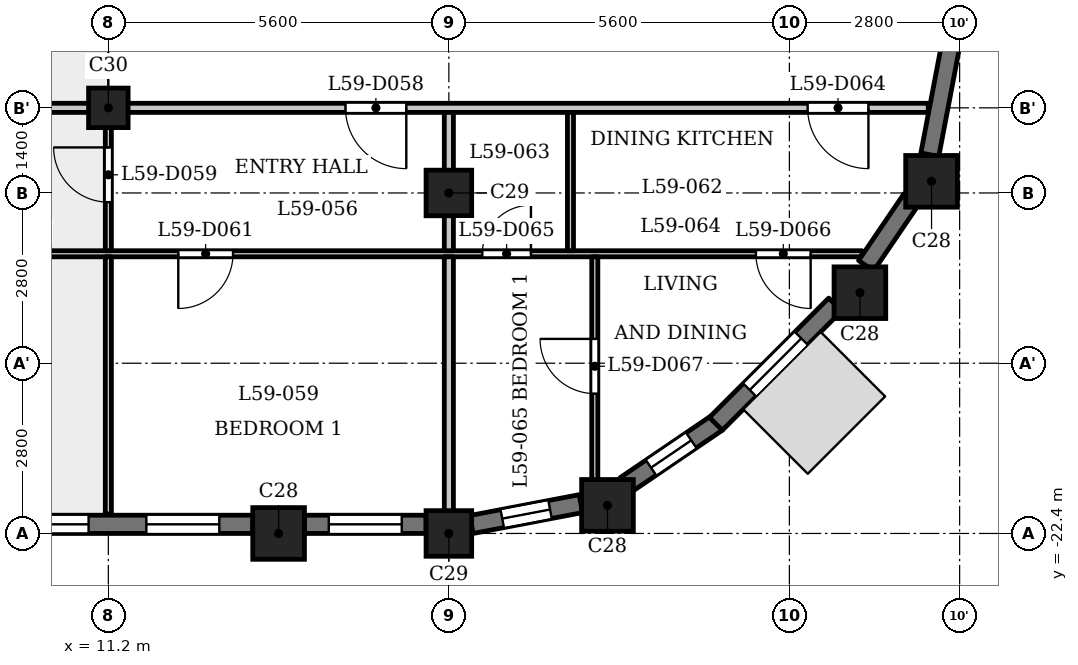
"""IFC4 building model, lengths in metres.
Left out: names, types, materials, properties, quantities, classifications, styles, units other than length and angle.
Written with IfcOpenShell. Run it as: python <this file> out.ifc"""

import sys

from ifc_helpers import new_model, si_unit, direction, frame, frame_2d, origin, origin_2d, place, context, subcontext, project, spatial, rectangle, extrude, element, fill, save


model = new_model("IFC4")
c1 = context("Model", 3, precision=1e-05, world=origin(), true_north=direction((0.0, 1.0)))
c2 = subcontext(c1, "Body", "Model", "MODEL_VIEW")
j1 = project(units=[si_unit("LENGTHUNIT", "METRE"), si_unit("PLANEANGLEUNIT", "RADIAN")], contexts=[c1])
p1 = place(None, origin())
s1 = spatial("IfcSite", under=j1, at=p1, CompositionType="ELEMENT")
p2 = place(p1, origin())
s2 = spatial("IfcBuilding", under=s1, at=p2, CompositionType="ELEMENT")
p3 = place(p2, frame((0.0, 0.0, 227.4)))
s3 = spatial("IfcBuildingStorey", under=s2, at=p3, CompositionType="ELEMENT", Elevation=227.4)
for number, where, z_axis, x_axis in (
    (1, (14.0, -22.4, 0.0), (0.0, 0.0, 1.0), (1.0, 0.0, 0.0)),
    (2, (19.409, -21.938, 0.0), (0.0, 0.0, 1.0), (1.0, 0.0, 0.0)),
    (3, (23.56, -18.44, 0.0), (0.0, 0.0, 1.0), (1.0, 0.0, 0.0)),
    (4, (24.738, -16.609, 0.0), (0.0, 0.0, 1.0), (1.0, 0.0, 0.0)),
):
    element("IfcColumn", number, at=place(p3, frame(where, z_axis=z_axis, x_axis=x_axis)), inside=s3, PredefinedType="COLUMN", context=c2, shape_type="SweptSolid", body=[
        extrude(rectangle(XDim=0.85, YDim=0.85, at=origin_2d()), origin(), (0.0, 0.0, 1.0), 3.5),
    ])
for number, where, z_axis, x_axis in (
    (5, (16.8, -22.4, 0.0), (0.0, 0.0, 1.0), (1.0, 0.0, 0.0)),
    (6, (16.8, -16.8, 0.0), (0.0, 0.0, 1.0), (1.0, 0.0, 0.0)),
):
    element("IfcColumn", number, at=place(p3, frame(where, z_axis=z_axis, x_axis=x_axis)), inside=s3, PredefinedType="COLUMN", context=c2, shape_type="SweptSolid", body=[
        extrude(rectangle(XDim=0.75, YDim=0.75, at=origin_2d()), origin(), (0.0, 0.0, 1.0), 3.5),
    ])
p4 = place(p3, frame((11.2, -15.4, 0.0), z_axis=(0.0, 0.0, 1.0), x_axis=(1.0, 0.0, 0.0)))
e7 = element("IfcColumn", 7, at=p4, inside=s3, PredefinedType="COLUMN", context=c2, shape_type="SweptSolid", body=[
    extrude(rectangle(XDim=0.65, YDim=0.65, at=origin_2d()), origin(), (0.0, 0.0, 1.0), 3.5),
])
p5 = place(p3, frame((8.825, -22.25, 0.0), z_axis=(0.0, 0.0, 1.0), x_axis=(1.0, 0.0, 0.0)))
e8 = element("IfcWall", 8, at=p5, inside=s3, PredefinedType="SOLIDWALL", context=c2, shape_type="SweptSolid", body=[
    extrude(rectangle(XDim=4.75, YDim=0.3, at=frame_2d((2.375, 0.0))), origin(), (0.0, 0.0, 1.0), 2.45),
])
p6 = place(p5, frame((0.25, 0.0, 0.9)))
e9 = element("IfcOpeningElement", 9, at=p6, cuts=e8, PredefinedType="OPENING", context=c2, shape_type="SweptSolid", body=[
    extrude(rectangle(XDim=1.8, YDim=1.25, at=frame_2d((0.9, 0.625))), frame((0.0, 0.16, 0.0), z_axis=(0.0, -1.0, 0.0), x_axis=(1.0, 0.0, 0.0)), (0.0, 0.0, 1.0), 0.32),
])
p7 = place(p5, frame((3.0, 0.0, 0.6)))
e10 = element("IfcOpeningElement", 10, at=p7, cuts=e8, PredefinedType="OPENING", context=c2, shape_type="SweptSolid", body=[
    extrude(rectangle(XDim=1.2, YDim=1.55, at=frame_2d((0.6, 0.775))), frame((0.0, 0.16, 0.0), z_axis=(0.0, -1.0, 0.0), x_axis=(1.0, 0.0, 0.0)), (0.0, 0.0, 1.0), 0.32),
])
p8 = place(p3, frame((14.425, -22.25, 0.0), z_axis=(0.0, 0.0, 1.0), x_axis=(1.0, 0.0, 0.0)))
e11 = element("IfcWall", 11, at=p8, inside=s3, PredefinedType="SOLIDWALL", context=c2, shape_type="SweptSolid", body=[
    extrude(rectangle(XDim=2.0, YDim=0.3, at=frame_2d((1.0, 0.0))), origin(), (0.0, 0.0, 1.0), 2.45),
])
p9 = place(p8, frame((0.4, 0.0, 0.6)))
e12 = element("IfcOpeningElement", 12, at=p9, cuts=e11, PredefinedType="OPENING", context=c2, shape_type="SweptSolid", body=[
    extrude(rectangle(XDim=1.2, YDim=1.55, at=frame_2d((0.6, 0.775))), frame((0.0, 0.16, 0.0), z_axis=(0.0, -1.0, 0.0), x_axis=(1.0, 0.0, 0.0)), (0.0, 0.0, 1.0), 0.32),
])
p10 = place(p3, frame((17.172, -22.253, 0.0), z_axis=(0.0, 0.0, 1.0), x_axis=(0.982300037503, 0.187314271538, 0.0)))
e13 = element("IfcWall", 13, at=p10, inside=s3, PredefinedType="SOLIDWALL", context=c2, shape_type="SweptSolid", body=[
    extrude(rectangle(XDim=1.831, YDim=0.3, at=frame_2d((0.916, 0.0))), origin(), (0.0, 0.0, 1.0), 2.45),
])
p11 = place(p10, frame((0.516, 0.0, 0.6)))
e14 = element("IfcOpeningElement", 14, at=p11, cuts=e13, PredefinedType="OPENING", context=c2, shape_type="SweptSolid", body=[
    extrude(rectangle(XDim=0.8, YDim=1.55, at=frame_2d((0.4, 0.775))), frame((0.0, 0.16, 0.0), z_axis=(0.0, -1.0, 0.0), x_axis=(1.0, 0.0, 0.0)), (0.0, 0.0, 1.0), 0.32),
])
p12 = place(p3, frame((19.698, -21.608, 0.0), z_axis=(0.0, 0.0, 1.0), x_axis=(0.82705295608, 0.562124014644, 0.0)))
e15 = element("IfcWall", 15, at=p12, inside=s3, PredefinedType="SOLIDWALL", context=c2, shape_type="SweptSolid", body=[
    extrude(rectangle(XDim=1.831, YDim=0.3, at=frame_2d((0.916, 0.0))), origin(), (0.0, 0.0, 1.0), 2.45),
])
p13 = place(p12, frame((0.516, 0.0, 0.6)))
e16 = element("IfcOpeningElement", 16, at=p13, cuts=e15, PredefinedType="OPENING", context=c2, shape_type="SweptSolid", body=[
    extrude(rectangle(XDim=0.8, YDim=1.55, at=frame_2d((0.4, 0.775))), frame((0.0, 0.16, 0.0), z_axis=(0.0, -1.0, 0.0), x_axis=(1.0, 0.0, 0.0)), (0.0, 0.0, 1.0), 0.32),
])
p14 = place(p3, frame((21.191, -20.597, 0.0), z_axis=(0.0, 0.0, 1.0), x_axis=(0.707150767798, 0.707062791838, 0.0)))
e17 = element("IfcWall", 17, at=p14, inside=s3, PredefinedType="SOLIDWALL", context=c2, shape_type="SweptSolid", body=[
    extrude(rectangle(XDim=2.775, YDim=0.3, at=frame_2d((1.388, 0.0))), origin(), (0.0, 0.0, 1.0), 2.45),
])
p15 = place(p14, frame((0.788, 0.0, 0.6)))
e18 = element("IfcOpeningElement", 18, at=p15, cuts=e17, PredefinedType="OPENING", context=c2, shape_type="SweptSolid", body=[
    extrude(rectangle(XDim=1.2, YDim=1.55, at=frame_2d((0.6, 0.775))), frame((0.0, 0.16, 0.0), z_axis=(0.0, -1.0, 0.0), x_axis=(1.0, 0.0, 0.0)), (0.0, 0.0, 1.0), 0.32),
])
p16 = place(p3, frame((23.662, -17.996, 0.0), z_axis=(0.0, 0.0, 1.0), x_axis=(0.562149004813, 0.827035970432, 0.0)))
e19 = element("IfcWall", 19, at=p16, inside=s3, PredefinedType="SOLIDWALL", context=c2, shape_type="SweptSolid", body=[
    extrude(rectangle(XDim=1.327, YDim=0.3, at=frame_2d((0.664, 0.0))), origin(), (0.0, 0.0, 1.0), 2.45),
])
p17 = place(p3, frame((24.709, -16.171, 0.0), z_axis=(0.0, 0.0, 1.0), x_axis=(0.187442908742, 0.982275499014, 0.0)))
e20 = element("IfcWall", 20, at=p17, inside=s3, PredefinedType="SOLIDWALL", context=c2, shape_type="SweptSolid", body=[
    extrude(rectangle(XDim=1.831, YDim=0.3, at=frame_2d((0.916, 0.0))), origin(), (0.0, 0.0, 1.0), 2.45),
])
p18 = place(p3, frame((-23.594, -17.8, 0.0), z_axis=(0.0, 0.0, 1.0), x_axis=(1.0, 0.0, 0.0)))
e21 = element("IfcWall", 21, at=p18, inside=s3, PredefinedType="PARTITIONING", context=c2, shape_type="SweptSolid", body=[
    extrude(rectangle(XDim=47.188, YDim=0.1, at=frame_2d((23.594, 0.0))), origin(), (0.0, 0.0, 1.0), 3.15),
])
p19 = place(p18, frame((5.094, 0.0, 0.0)))
e22 = element("IfcOpeningElement", 22, at=p19, cuts=e21, PredefinedType="OPENING", context=c2, shape_type="SweptSolid", body=[
    extrude(rectangle(XDim=0.8, YDim=2.1, at=frame_2d((0.4, 1.05))), frame((0.0, 0.06, 0.0), z_axis=(0.0, -1.0, 0.0), x_axis=(1.0, 0.0, 0.0)), (0.0, 0.0, 1.0), 0.12),
])
p20 = place(p18, frame((1.126, 0.0, 0.0)))
e23 = element("IfcOpeningElement", 23, at=p20, cuts=e21, PredefinedType="OPENING", context=c2, shape_type="SweptSolid", body=[
    extrude(rectangle(XDim=0.9, YDim=2.1, at=frame_2d((0.45, 1.05))), frame((0.0, 0.06, 0.0), z_axis=(0.0, -1.0, 0.0), x_axis=(1.0, 0.0, 0.0)), (0.0, 0.0, 1.0), 0.12),
])
p21 = place(p18, frame((9.944, 0.0, 0.0)))
e24 = element("IfcOpeningElement", 24, at=p21, cuts=e21, PredefinedType="OPENING", context=c2, shape_type="SweptSolid", body=[
    extrude(rectangle(XDim=0.8, YDim=2.1, at=frame_2d((0.4, 1.05))), frame((0.0, 0.06, 0.0), z_axis=(0.0, -1.0, 0.0), x_axis=(1.0, 0.0, 0.0)), (0.0, 0.0, 1.0), 0.12),
])
p22 = place(p18, frame((7.444, 0.0, 0.0)))
e25 = element("IfcOpeningElement", 25, at=p22, cuts=e21, PredefinedType="OPENING", context=c2, shape_type="SweptSolid", body=[
    extrude(rectangle(XDim=0.9, YDim=2.1, at=frame_2d((0.45, 1.05))), frame((0.0, 0.06, 0.0), z_axis=(0.0, -1.0, 0.0), x_axis=(1.0, 0.0, 0.0)), (0.0, 0.0, 1.0), 0.12),
])
p23 = place(p18, frame((16.544, 0.0, 0.0)))
e26 = element("IfcOpeningElement", 26, at=p23, cuts=e21, PredefinedType="OPENING", context=c2, shape_type="SweptSolid", body=[
    extrude(rectangle(XDim=0.8, YDim=2.1, at=frame_2d((0.4, 1.05))), frame((0.0, 0.06, 0.0), z_axis=(0.0, -1.0, 0.0), x_axis=(1.0, 0.0, 0.0)), (0.0, 0.0, 1.0), 0.12),
])
p24 = place(p18, frame((13.294, 0.0, 0.0)))
e27 = element("IfcOpeningElement", 27, at=p24, cuts=e21, PredefinedType="OPENING", context=c2, shape_type="SweptSolid", body=[
    extrude(rectangle(XDim=0.9, YDim=2.1, at=frame_2d((0.45, 1.05))), frame((0.0, 0.06, 0.0), z_axis=(0.0, -1.0, 0.0), x_axis=(1.0, 0.0, 0.0)), (0.0, 0.0, 1.0), 0.12),
])
p25 = place(p18, frame((21.144, 0.0, 0.0)))
e28 = element("IfcOpeningElement", 28, at=p25, cuts=e21, PredefinedType="OPENING", context=c2, shape_type="SweptSolid", body=[
    extrude(rectangle(XDim=0.8, YDim=2.1, at=frame_2d((0.4, 1.05))), frame((0.0, 0.06, 0.0), z_axis=(0.0, -1.0, 0.0), x_axis=(1.0, 0.0, 0.0)), (0.0, 0.0, 1.0), 0.12),
])
p26 = place(p18, frame((18.894, 0.0, 0.0)))
e29 = element("IfcOpeningElement", 29, at=p26, cuts=e21, PredefinedType="OPENING", context=c2, shape_type="SweptSolid", body=[
    extrude(rectangle(XDim=0.9, YDim=2.1, at=frame_2d((0.45, 1.05))), frame((0.0, 0.06, 0.0), z_axis=(0.0, -1.0, 0.0), x_axis=(1.0, 0.0, 0.0)), (0.0, 0.0, 1.0), 0.12),
])
p27 = place(p18, frame((35.944, 0.0, 0.0)))
e30 = element("IfcOpeningElement", 30, at=p27, cuts=e21, PredefinedType="OPENING", context=c2, shape_type="SweptSolid", body=[
    extrude(rectangle(XDim=0.9, YDim=2.1, at=frame_2d((0.45, 1.05))), frame((0.0, 0.06, 0.0), z_axis=(0.0, -1.0, 0.0), x_axis=(1.0, 0.0, 0.0)), (0.0, 0.0, 1.0), 0.12),
])
p28 = place(p18, frame((32.594, 0.0, 0.0)))
e31 = element("IfcOpeningElement", 31, at=p28, cuts=e21, PredefinedType="OPENING", context=c2, shape_type="SweptSolid", body=[
    extrude(rectangle(XDim=0.9, YDim=2.1, at=frame_2d((0.45, 1.05))), frame((0.0, 0.06, 0.0), z_axis=(0.0, -1.0, 0.0), x_axis=(1.0, 0.0, 0.0)), (0.0, 0.0, 1.0), 0.12),
])
p29 = place(p18, frame((40.944, 0.0, 0.0)))
e32 = element("IfcOpeningElement", 32, at=p29, cuts=e21, PredefinedType="OPENING", context=c2, shape_type="SweptSolid", body=[
    extrude(rectangle(XDim=0.8, YDim=2.1, at=frame_2d((0.4, 1.05))), frame((0.0, 0.06, 0.0), z_axis=(0.0, -1.0, 0.0), x_axis=(1.0, 0.0, 0.0)), (0.0, 0.0, 1.0), 0.12),
])
p30 = place(p18, frame((45.444, 0.0, 0.0)))
e33 = element("IfcOpeningElement", 33, at=p30, cuts=e21, PredefinedType="OPENING", context=c2, shape_type="SweptSolid", body=[
    extrude(rectangle(XDim=0.9, YDim=2.1, at=frame_2d((0.45, 1.05))), frame((0.0, 0.06, 0.0), z_axis=(0.0, -1.0, 0.0), x_axis=(1.0, 0.0, 0.0)), (0.0, 0.0, 1.0), 0.12),
])
p31 = place(p3, frame((-24.684, -15.4, 0.0), z_axis=(0.0, 0.0, 1.0), x_axis=(1.0, 0.0, 0.0)))
e34 = element("IfcWall", 34, at=p31, inside=s3, PredefinedType="PARTITIONING", context=c2, shape_type="SweptSolid", body=[
    extrude(rectangle(XDim=49.368, YDim=0.15, at=frame_2d((24.684, 0.0))), origin(), (0.0, 0.0, 1.0), 3.15),
])
p32 = place(p31, frame((1.143, 0.0, 0.0)))
e35 = element("IfcOpeningElement", 35, at=p32, cuts=e34, PredefinedType="OPENING", context=c2, shape_type="SweptSolid", body=[
    extrude(rectangle(XDim=1.0, YDim=2.1, at=frame_2d((0.5, 1.05))), frame((0.0, 0.085, 0.0), z_axis=(0.0, -1.0, 0.0), x_axis=(1.0, 0.0, 0.0)), (0.0, 0.0, 1.0), 0.17),
])
p33 = place(p31, frame((8.534, 0.0, 0.0)))
e36 = element("IfcOpeningElement", 36, at=p33, cuts=e34, PredefinedType="OPENING", context=c2, shape_type="SweptSolid", body=[
    extrude(rectangle(XDim=1.0, YDim=2.1, at=frame_2d((0.5, 1.05))), frame((0.0, 0.085, 0.0), z_axis=(0.0, -1.0, 0.0), x_axis=(1.0, 0.0, 0.0)), (0.0, 0.0, 1.0), 0.17),
])
p34 = place(p31, frame((15.384, 0.0, 0.0)))
e37 = element("IfcOpeningElement", 37, at=p34, cuts=e34, PredefinedType="OPENING", context=c2, shape_type="SweptSolid", body=[
    extrude(rectangle(XDim=1.0, YDim=2.1, at=frame_2d((0.5, 1.05))), frame((0.0, 0.085, 0.0), z_axis=(0.0, -1.0, 0.0), x_axis=(1.0, 0.0, 0.0)), (0.0, 0.0, 1.0), 0.17),
])
p35 = place(p31, frame((19.984, 0.0, 0.0)))
e38 = element("IfcOpeningElement", 38, at=p35, cuts=e34, PredefinedType="OPENING", context=c2, shape_type="SweptSolid", body=[
    extrude(rectangle(XDim=1.0, YDim=2.1, at=frame_2d((0.5, 1.05))), frame((0.0, 0.085, 0.0), z_axis=(0.0, -1.0, 0.0), x_axis=(1.0, 0.0, 0.0)), (0.0, 0.0, 1.0), 0.17),
])
p36 = place(p31, frame((39.784, 0.0, 0.0)))
e39 = element("IfcOpeningElement", 39, at=p36, cuts=e34, PredefinedType="OPENING", context=c2, shape_type="SweptSolid", body=[
    extrude(rectangle(XDim=1.0, YDim=2.1, at=frame_2d((0.5, 1.05))), frame((0.0, 0.085, 0.0), z_axis=(0.0, -1.0, 0.0), x_axis=(1.0, 0.0, 0.0)), (0.0, 0.0, 1.0), 0.17),
])
p37 = place(p31, frame((47.384, 0.0, 0.0)))
e40 = element("IfcOpeningElement", 40, at=p37, cuts=e34, PredefinedType="OPENING", context=c2, shape_type="SweptSolid", body=[
    extrude(rectangle(XDim=1.0, YDim=2.1, at=frame_2d((0.5, 1.05))), frame((0.0, 0.085, 0.0), z_axis=(0.0, -1.0, 0.0), x_axis=(1.0, 0.0, 0.0)), (0.0, 0.0, 1.0), 0.17),
])
p38 = place(p3, frame((11.2, -22.08, 0.0), z_axis=(0.0, 0.0, 1.0), x_axis=(0.0, 1.0, 0.0)))
e41 = element("IfcWall", 41, at=p38, inside=s3, PredefinedType="PARTITIONING", context=c2, shape_type="SweptSolid", body=[
    extrude(rectangle(XDim=4.23, YDim=0.1, at=frame_2d((2.115, 0.0))), origin(), (0.0, 0.0, 1.0), 3.15),
])
p39 = place(p3, frame((11.2, -17.75, 0.0), z_axis=(0.0, 0.0, 1.0), x_axis=(0.0, 1.0, 0.0)))
e42 = element("IfcWall", 42, at=p39, inside=s3, PredefinedType="PARTITIONING", context=c2, shape_type="SweptSolid", body=[
    extrude(rectangle(XDim=2.275, YDim=0.1, at=frame_2d((1.137, 0.0))), origin(), (0.0, 0.0, 1.0), 3.15),
])
p40 = place(p39, frame((0.799, 0.0, 0.0)))
e43 = element("IfcOpeningElement", 43, at=p40, cuts=e42, PredefinedType="OPENING", context=c2, shape_type="SweptSolid", body=[
    extrude(rectangle(XDim=0.9, YDim=2.1, at=frame_2d((0.45, 1.05))), frame((0.0, 0.06, 0.0), z_axis=(0.0, -1.0, 0.0), x_axis=(1.0, 0.0, 0.0)), (0.0, 0.0, 1.0), 0.12),
])
p41 = place(p3, frame((16.8, -22.31, 0.0), z_axis=(0.0, 0.0, 1.0), x_axis=(0.0, 1.0, 0.0)))
e44 = element("IfcWall", 44, at=p41, inside=s3, PredefinedType="PARTITIONING", context=c2, shape_type="SweptSolid", body=[
    extrude(rectangle(XDim=4.46, YDim=0.15, at=frame_2d((2.23, 0.0))), origin(), (0.0, 0.0, 1.0), 2.5),
])
p42 = place(p3, frame((16.8, -17.75, 0.0), z_axis=(0.0, 0.0, 1.0), x_axis=(0.0, 1.0, 0.0)))
e45 = element("IfcWall", 45, at=p42, inside=s3, PredefinedType="PARTITIONING", context=c2, shape_type="SweptSolid", body=[
    extrude(rectangle(XDim=2.275, YDim=0.15, at=frame_2d((1.137, 0.0))), origin(), (0.0, 0.0, 1.0), 2.5),
])
p43 = place(p3, frame((18.8, -17.75, 0.0), z_axis=(0.0, 0.0, 1.0), x_axis=(0.0, 1.0, 0.0)))
e46 = element("IfcWall", 46, at=p43, inside=s3, PredefinedType="PARTITIONING", context=c2, shape_type="SweptSolid", body=[
    extrude(rectangle(XDim=2.275, YDim=0.1, at=frame_2d((1.137, 0.0))), origin(), (0.0, 0.0, 1.0), 3.15),
])
p44 = place(p3, frame((19.2, -21.92, 0.0), z_axis=(0.0, 0.0, 1.0), x_axis=(0.0, 1.0, 0.0)))
e47 = element("IfcWall", 47, at=p44, inside=s3, PredefinedType="PARTITIONING", context=c2, shape_type="SweptSolid", body=[
    extrude(rectangle(XDim=4.07, YDim=0.1, at=frame_2d((2.035, 0.0))), origin(), (0.0, 0.0, 1.0), 3.15),
])
p45 = place(p44, frame((1.82, 0.0, 0.0)))
e48 = element("IfcOpeningElement", 48, at=p45, cuts=e47, PredefinedType="OPENING", context=c2, shape_type="SweptSolid", body=[
    extrude(rectangle(XDim=0.9, YDim=2.1, at=frame_2d((0.45, 1.05))), frame((0.0, 0.06, 0.0), z_axis=(0.0, -1.0, 0.0), x_axis=(1.0, 0.0, 0.0)), (0.0, 0.0, 1.0), 0.12),
])
p46 = place(p36, origin())
e49 = element("IfcDoor", 49, at=p46, inside=s3, OperationType="SINGLE_SWING_RIGHT", PredefinedType="DOOR", context=c2, shape_type="SweptSolid", body=[
    extrude(rectangle(XDim=1.0, YDim=2.1, at=frame_2d((0.5, 1.05))), frame((0.0, 0.025, 0.0), z_axis=(0.0, -1.0, 0.0), x_axis=(1.0, 0.0, 0.0)), (0.0, 0.0, 1.0), 0.05),
])
fill(e39, e49)
p47 = place(p40, origin())
e50 = element("IfcDoor", 50, at=p47, inside=s3, OperationType="SINGLE_SWING_LEFT", PredefinedType="DOOR", context=c2, shape_type="SweptSolid", body=[
    extrude(rectangle(XDim=0.9, YDim=2.1, at=frame_2d((0.45, 1.05))), frame((0.0, 0.025, 0.0), z_axis=(0.0, -1.0, 0.0), x_axis=(1.0, 0.0, 0.0)), (0.0, 0.0, 1.0), 0.05),
])
fill(e43, e50)
p48 = place(p27, origin())
e51 = element("IfcDoor", 51, at=p48, inside=s3, OperationType="SINGLE_SWING_LEFT", PredefinedType="DOOR", context=c2, shape_type="SweptSolid", body=[
    extrude(rectangle(XDim=0.9, YDim=2.1, at=frame_2d((0.45, 1.05))), frame((0.0, 0.025, 0.0), z_axis=(0.0, -1.0, 0.0), x_axis=(1.0, 0.0, 0.0)), (0.0, 0.0, 1.0), 0.05),
])
fill(e30, e51)
p49 = place(p37, origin())
e52 = element("IfcDoor", 52, at=p49, inside=s3, OperationType="SINGLE_SWING_RIGHT", PredefinedType="DOOR", context=c2, shape_type="SweptSolid", body=[
    extrude(rectangle(XDim=1.0, YDim=2.1, at=frame_2d((0.5, 1.05))), frame((0.0, 0.025, 0.0), z_axis=(0.0, -1.0, 0.0), x_axis=(1.0, 0.0, 0.0)), (0.0, 0.0, 1.0), 0.05),
])
fill(e40, e52)
p50 = place(p29, origin())
e53 = element("IfcDoor", 53, at=p50, inside=s3, OperationType="SINGLE_SWING_LEFT", PredefinedType="DOOR", context=c2, shape_type="SweptSolid", body=[
    extrude(rectangle(XDim=0.8, YDim=2.1, at=frame_2d((0.4, 1.05))), frame((0.0, 0.025, 0.0), z_axis=(0.0, -1.0, 0.0), x_axis=(1.0, 0.0, 0.0)), (0.0, 0.0, 1.0), 0.05),
])
fill(e32, e53)
p51 = place(p30, origin())
e54 = element("IfcDoor", 54, at=p51, inside=s3, OperationType="SINGLE_SWING_RIGHT", PredefinedType="DOOR", context=c2, shape_type="SweptSolid", body=[
    extrude(rectangle(XDim=0.9, YDim=2.1, at=frame_2d((0.45, 1.05))), frame((0.0, 0.025, 0.0), z_axis=(0.0, -1.0, 0.0), x_axis=(1.0, 0.0, 0.0)), (0.0, 0.0, 1.0), 0.05),
])
fill(e33, e54)
p52 = place(p45, origin())
e55 = element("IfcDoor", 55, at=p52, inside=s3, OperationType="SINGLE_SWING_LEFT", PredefinedType="DOOR", context=c2, shape_type="SweptSolid", body=[
    extrude(rectangle(XDim=0.9, YDim=2.1, at=frame_2d((0.45, 1.05))), frame((0.0, 0.025, 0.0), z_axis=(0.0, -1.0, 0.0), x_axis=(1.0, 0.0, 0.0)), (0.0, 0.0, 1.0), 0.05),
])
fill(e48, e55)
p53 = place(p6, origin())
e56 = element("IfcWindow", 56, at=p53, inside=s3, PartitioningType="SINGLE_PANEL", PredefinedType="WINDOW", context=c2, shape_type="SweptSolid", body=[
    extrude(rectangle(XDim=1.8, YDim=1.25, at=frame_2d((0.9, 0.625))), frame((0.0, 0.03, 0.0), z_axis=(0.0, -1.0, 0.0), x_axis=(1.0, 0.0, 0.0)), (0.0, 0.0, 1.0), 0.06),
])
fill(e9, e56)
p54 = place(p7, origin())
e57 = element("IfcWindow", 57, at=p54, inside=s3, PartitioningType="SINGLE_PANEL", PredefinedType="WINDOW", context=c2, shape_type="SweptSolid", body=[
    extrude(rectangle(XDim=1.2, YDim=1.55, at=frame_2d((0.6, 0.775))), frame((0.0, 0.03, 0.0), z_axis=(0.0, -1.0, 0.0), x_axis=(1.0, 0.0, 0.0)), (0.0, 0.0, 1.0), 0.06),
])
fill(e10, e57)
p55 = place(p9, origin())
e58 = element("IfcWindow", 58, at=p55, inside=s3, PartitioningType="SINGLE_PANEL", PredefinedType="WINDOW", context=c2, shape_type="SweptSolid", body=[
    extrude(rectangle(XDim=1.2, YDim=1.55, at=frame_2d((0.6, 0.775))), frame((0.0, 0.03, 0.0), z_axis=(0.0, -1.0, 0.0), x_axis=(1.0, 0.0, 0.0)), (0.0, 0.0, 1.0), 0.06),
])
fill(e12, e58)
p56 = place(p11, origin())
e59 = element("IfcWindow", 59, at=p56, inside=s3, PartitioningType="SINGLE_PANEL", PredefinedType="WINDOW", context=c2, shape_type="SweptSolid", body=[
    extrude(rectangle(XDim=0.8, YDim=1.55, at=frame_2d((0.4, 0.775))), frame((0.0, 0.03, 0.0), z_axis=(0.0, -1.0, 0.0), x_axis=(1.0, 0.0, 0.0)), (0.0, 0.0, 1.0), 0.06),
])
fill(e14, e59)
p57 = place(p13, origin())
e60 = element("IfcWindow", 60, at=p57, inside=s3, PartitioningType="SINGLE_PANEL", PredefinedType="WINDOW", context=c2, shape_type="SweptSolid", body=[
    extrude(rectangle(XDim=0.8, YDim=1.55, at=frame_2d((0.4, 0.775))), frame((0.0, 0.03, 0.0), z_axis=(0.0, -1.0, 0.0), x_axis=(1.0, 0.0, 0.0)), (0.0, 0.0, 1.0), 0.06),
])
fill(e16, e60)
p58 = place(p15, origin())
e61 = element("IfcWindow", 61, at=p58, inside=s3, PartitioningType="SINGLE_PANEL", PredefinedType="WINDOW", context=c2, shape_type="SweptSolid", body=[
    extrude(rectangle(XDim=1.2, YDim=1.55, at=frame_2d((0.6, 0.775))), frame((0.0, 0.03, 0.0), z_axis=(0.0, -1.0, 0.0), x_axis=(1.0, 0.0, 0.0)), (0.0, 0.0, 1.0), 0.06),
])
fill(e18, e61)
save(model, sys.argv[1])
